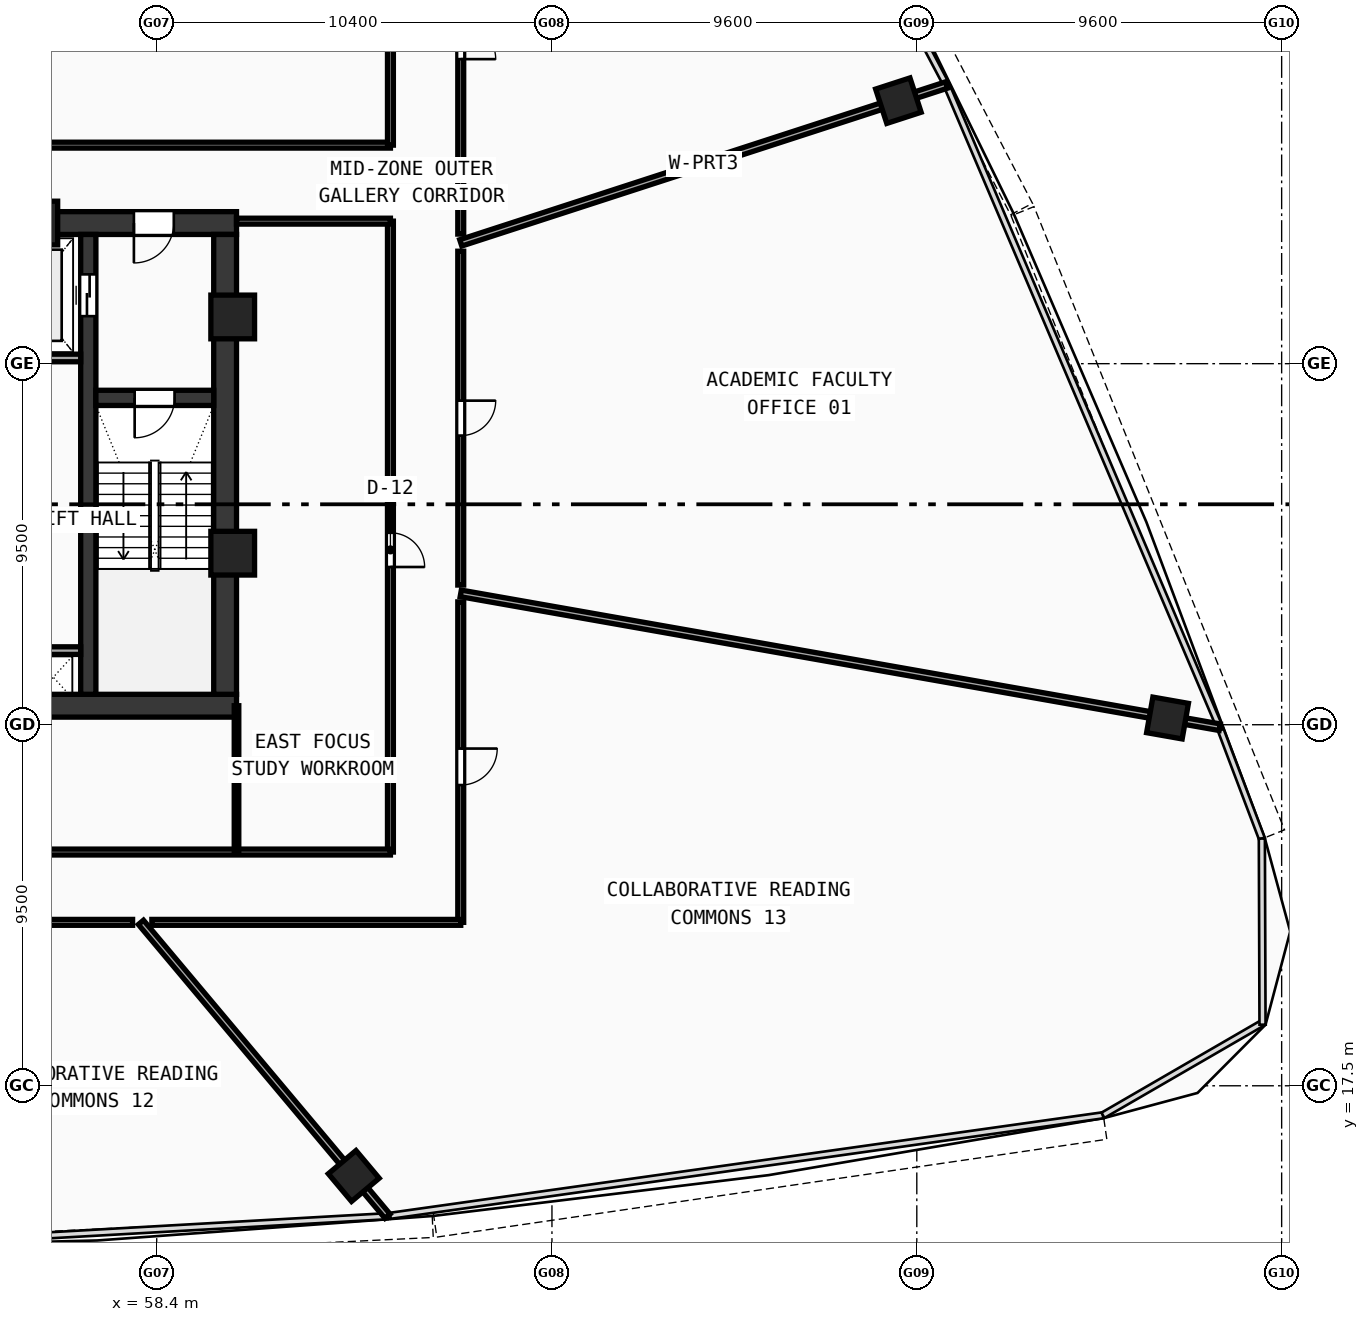
"""IFC4 building model, lengths in metres.
Left out: names, types, materials, properties, quantities, classifications, styles, units other than length and angle.
Written with IfcOpenShell. Run it as: python <this file> out.ifc"""

import sys

from ifc_helpers import new_model, si_unit, direction, frame, frame_2d, origin, origin_with_axes, origin_2d, place, context, subcontext, project, spatial, rectangle, hollow_rectangle, extrude, source, transform, mapped, element, fill, save


model = new_model("IFC4")
c1 = context("Model", 3, precision=1e-05, world=origin(), true_north=direction((0.0, 1.0)))
c2 = subcontext(c1, "Body", "Model", "MODEL_VIEW")
j1 = project(units=[si_unit("LENGTHUNIT", "METRE"), si_unit("PLANEANGLEUNIT", "RADIAN")], contexts=[c1])
p1 = place(None, origin())
s1 = spatial("IfcSite", under=j1, at=p1, CompositionType="ELEMENT")
p2 = place(p1, origin())
s2 = spatial("IfcBuilding", under=s1, at=p2, CompositionType="ELEMENT")
p3 = place(p2, frame((0.0, 0.0, 155.59)))
s3 = spatial("IfcBuildingStorey", under=s2, at=p3, CompositionType="ELEMENT", Elevation=155.59)
p4 = place(p3, frame((35.5, 27.5, 0.0), z_axis=(0.0, 0.0, 1.0), x_axis=(1.0, 0.0, 0.0)))
e1 = element("IfcWall", 1, at=p4, inside=s3, PredefinedType="SHEAR", context=c2, shape_type="SweptSolid", body=[
    extrude(rectangle(XDim=25.0, YDim=0.6, at=frame_2d((12.5, 0.0))), origin(), (0.0, 0.0, 1.0), 3.42),
])
p5 = place(p3, frame((49.2, 40.2, 0.0), z_axis=(0.0, 0.0, 1.0), x_axis=(1.0, 0.0, 0.0)))
e2 = element("IfcWall", 2, at=p5, inside=s3, PredefinedType="SHEAR", context=c2, shape_type="SweptSolid", body=[
    extrude(rectangle(XDim=11.3, YDim=0.6, at=frame_2d((5.65, 0.0))), origin(), (0.0, 0.0, 1.0), 3.42),
])
p6 = place(p5, frame((8.6, 0.0, 0.0)))
e3 = element("IfcOpeningElement", 3, at=p6, cuts=e2, PredefinedType="OPENING", context=c2, shape_type="SweptSolid", body=[
    extrude(rectangle(XDim=1.05, YDim=2.1, at=frame_2d((0.525, 1.05))), frame((0.0, 0.31, 0.0), z_axis=(0.0, -1.0, 0.0), x_axis=(1.0, 0.0, 0.0)), (0.0, 0.0, 1.0), 0.62),
])
p7 = place(p3, frame((60.2, 27.8, 0.0), z_axis=(0.0, 0.0, 1.0), x_axis=(0.0, 1.0, 0.0)))
e4 = element("IfcWall", 4, at=p7, inside=s3, PredefinedType="SHEAR", context=c2, shape_type="SweptSolid", body=[
    extrude(rectangle(XDim=12.1, YDim=0.6, at=frame_2d((6.05, 0.0))), origin(), (0.0, 0.0, 1.0), 3.42),
])
p8 = place(p3, frame((56.6, 27.8, 0.0), z_axis=(0.0, 0.0, 1.0), x_axis=(0.0, 1.0, 0.0)))
e5 = element("IfcWall", 5, at=p8, inside=s3, PredefinedType="SHEAR", context=c2, shape_type="SweptSolid", body=[
    extrude(rectangle(XDim=12.1, YDim=0.4, at=frame_2d((6.05, 0.0))), origin(), (0.0, 0.0, 1.0), 3.42),
])
p9 = place(p8, frame((9.95, 0.0, 0.0)))
e6 = element("IfcOpeningElement", 6, at=p9, cuts=e5, PredefinedType="OPENING", context=c2, shape_type="SweptSolid", body=[
    extrude(rectangle(XDim=1.1, YDim=2.1, at=frame_2d((0.55, 1.05))), frame((0.0, 0.21, 0.0), z_axis=(0.0, -1.0, 0.0), x_axis=(1.0, 0.0, 0.0)), (0.0, 0.0, 1.0), 0.42),
])
p10 = place(p3, frame((56.8, 35.6, 0.0), z_axis=(0.0, 0.0, 1.0), x_axis=(1.0, 0.0, 0.0)))
e7 = element("IfcWall", 7, at=p10, inside=s3, PredefinedType="SHEAR", context=c2, shape_type="SweptSolid", body=[
    extrude(rectangle(XDim=3.1, YDim=0.4, at=frame_2d((1.55, 0.0))), origin(), (0.0, 0.0, 1.0), 3.42),
])
p11 = place(p10, frame((1.02, 0.0, 0.0)))
e8 = element("IfcOpeningElement", 8, at=p11, cuts=e7, PredefinedType="OPENING", context=c2, shape_type="SweptSolid", body=[
    extrude(rectangle(XDim=1.05, YDim=2.1, at=frame_2d((0.525, 1.05))), frame((0.0, 0.21, 0.0), z_axis=(0.0, -1.0, 0.0), x_axis=(1.0, 0.0, 0.0)), (0.0, 0.0, 1.0), 0.42),
])
m1 = source(origin(), c2, "Body", "SweptSolid", [
    extrude(hollow_rectangle(XDim=1.15, YDim=1.15, WallThickness=0.048, at=origin_2d()), origin(), (0.0, 0.0, 1.0), 3.68),
])
for number, where, z_axis, x_axis in (
    (9, (60.4, 31.513, -0.26), (0.0, 0.0, 1.0), (1.0, 0.0, 0.0)),
    (10, (60.4, 37.729, -0.26), (0.0, 0.0, 1.0), (1.0, 0.0, 0.0)),
    (11, (55.219, 40.2, -0.26), (0.0, 0.0, 1.0), (1.0, 0.0, 0.0)),
):
    element("IfcColumn", number, at=place(p3, frame(where, z_axis=z_axis, x_axis=x_axis)), inside=s3, PredefinedType="COLUMN", context=c2, shape_type="MappedRepresentation", body=[
        mapped(m1, transform((0.0, 0.0, 0.0), scale=1.0)),
    ])
m2 = source(origin(), c2, "Body", "SweptSolid", [
    extrude(hollow_rectangle(XDim=0.95, YDim=0.95, WallThickness=0.04, at=origin_2d()), origin(), (0.0, 0.0, 1.0), 3.68),
])
for number, where, z_axis, x_axis in (
    (12, (63.585, 15.126, -0.26), (0.0, 0.0, 1.0), (0.766, 0.643, 0.0)),
    (13, (84.997, 27.177, -0.26), (0.0, 0.0, 1.0), (0.174, 0.985, 0.0)),
    (14, (77.915, 43.42, -0.26), (0.0, 0.0, 1.0), (-0.309, 0.951, 0.0)),
):
    element("IfcColumn", number, at=place(p3, frame(where, z_axis=z_axis, x_axis=x_axis)), inside=s3, PredefinedType="COLUMN", context=c2, shape_type="MappedRepresentation", body=[
        mapped(m2, transform((0.0, 0.0, 0.0), scale=1.0)),
    ])
p12 = place(p3, frame((53.68, 36.65, 0.0), z_axis=(0.0, 0.0, 1.0), x_axis=(1.0, 0.0, 0.0)))
e15 = element("IfcWall", 15, at=p12, inside=s3, PredefinedType="SOLIDWALL", context=c2, shape_type="SweptSolid", body=[
    extrude(rectangle(XDim=2.72, YDim=0.2, at=frame_2d((1.36, 0.0))), origin(), (0.0, 0.0, 1.0), 3.42),
])
p13 = place(p3, frame((55.12, 28.95, 0.0), z_axis=(0.0, 0.0, 1.0), x_axis=(1.0, 0.0, 0.0)))
e16 = element("IfcWall", 16, at=p13, inside=s3, PredefinedType="SOLIDWALL", context=c2, shape_type="SweptSolid", body=[
    extrude(rectangle(XDim=1.28, YDim=0.2, at=frame_2d((0.64, 0.0))), origin(), (0.0, 0.0, 1.0), 3.42),
])
p14 = place(p3, frame((31.45, 42.25, 0.0), z_axis=(0.0, 0.0, 1.0), x_axis=(1.0, 0.0, 0.0)))
e17 = element("IfcWall", 17, at=p14, inside=s3, PredefinedType="PARTITIONING", context=c2, shape_type="SweptSolid", body=[
    extrude(rectangle(XDim=33.1, YDim=0.155, at=frame_2d((16.55, 0.0))), origin(), (0.0, 0.0, 1.0), 2.77),
])
p15 = place(p3, frame((64.55, 42.25, 0.0), z_axis=(0.0, 0.0, 1.0), x_axis=(0.0, 1.0, 0.0)))
e18 = element("IfcWall", 18, at=p15, inside=s3, PredefinedType="PARTITIONING", context=c2, shape_type="SweptSolid", body=[
    extrude(rectangle(XDim=11.7, YDim=0.155, at=frame_2d((5.85, 0.0))), origin(), (0.0, 0.0, 1.0), 2.77),
])
p16 = place(p3, frame((64.55, 23.65, 0.0), z_axis=(0.0, 0.0, 1.0), x_axis=(0.0, 1.0, 0.0)))
e19 = element("IfcWall", 19, at=p16, inside=s3, PredefinedType="PARTITIONING", context=c2, shape_type="SweptSolid", body=[
    extrude(rectangle(XDim=16.6, YDim=0.155, at=frame_2d((8.3, 0.0))), origin(), (0.0, 0.0, 1.0), 2.77),
])
p17 = place(p16, frame((7.5, 0.0, 0.0)))
e20 = element("IfcOpeningElement", 20, at=p17, cuts=e19, PredefinedType="OPENING", context=c2, shape_type="SweptSolid", body=[
    extrude(rectangle(XDim=0.9, YDim=2.08, at=frame_2d((0.45, 1.04))), frame((0.0, 0.087, 0.0), z_axis=(0.0, -1.0, 0.0), x_axis=(1.0, 0.0, 0.0)), (0.0, 0.0, 1.0), 0.175),
])
p18 = place(p3, frame((31.45, 23.65, 0.0), z_axis=(0.0, 0.0, 1.0), x_axis=(1.0, 0.0, 0.0)))
e21 = element("IfcWall", 21, at=p18, inside=s3, PredefinedType="PARTITIONING", context=c2, shape_type="SweptSolid", body=[
    extrude(rectangle(XDim=33.1, YDim=0.155, at=frame_2d((16.55, 0.0))), origin(), (0.0, 0.0, 1.0), 2.77),
])
p19 = place(p18, frame((16.0, 0.0, 0.0)))
e22 = element("IfcOpeningElement", 22, at=p19, cuts=e21, PredefinedType="OPENING", context=c2, shape_type="SweptSolid", body=[
    extrude(rectangle(XDim=0.92, YDim=2.1, at=frame_2d((0.46, 1.05))), frame((0.0, 0.087, 0.0), z_axis=(0.0, -1.0, 0.0), x_axis=(1.0, 0.0, 0.0)), (0.0, 0.0, 1.0), 0.175),
])
p20 = place(p3, frame((60.5, 40.25, 0.0), z_axis=(0.0, 0.0, 1.0), x_axis=(1.0, 0.0, 0.0)))
e23 = element("IfcWall", 23, at=p20, inside=s3, PredefinedType="PARTITIONING", context=c2, shape_type="SweptSolid", body=[
    extrude(rectangle(XDim=4.05, YDim=0.155, at=frame_2d((2.025, 0.0))), origin(), (0.0, 0.0, 1.0), 3.42),
])
p21 = place(p3, frame((60.5, 23.65, 0.0), z_axis=(0.0, 0.0, 1.0), x_axis=(0.0, 1.0, 0.0)))
e24 = element("IfcWall", 24, at=p21, inside=s3, PredefinedType="PARTITIONING", context=c2, shape_type="SweptSolid", body=[
    extrude(rectangle(XDim=3.85, YDim=0.12, at=frame_2d((1.925, 0.0))), origin(), (0.0, 0.0, 1.0), 3.02),
])
p22 = place(p3, frame((66.4, 39.678, 0.0), z_axis=(0.0, 0.0, 1.0), x_axis=(0.951059027278, 0.309009266259, 0.0)))
e25 = element("IfcWall", 25, at=p22, inside=s3, PredefinedType="PARTITIONING", context=c2, shape_type="SweptSolid", body=[
    extrude(rectangle(XDim=13.441, YDim=0.175, at=frame_2d((6.72, 0.0))), origin(), (0.0, 0.0, 1.0), 2.77),
])
p23 = place(p3, frame((57.985, 21.8, 0.0), z_axis=(0.0, 0.0, 1.0), x_axis=(0.642793186641, -0.766039763464, 0.0)))
e26 = element("IfcWall", 26, at=p23, inside=s3, PredefinedType="PARTITIONING", context=c2, shape_type="SweptSolid", body=[
    extrude(rectangle(XDim=10.093, YDim=0.175, at=frame_2d((5.046, 0.0))), origin(), (0.0, 0.0, 1.0), 2.77),
])
p24 = place(p3, frame((66.4, 30.456, 0.0), z_axis=(0.0, 0.0, 1.0), x_axis=(0.98480815319, -0.173645908133, 0.0)))
e27 = element("IfcWall", 27, at=p24, inside=s3, PredefinedType="PARTITIONING", context=c2, shape_type="SweptSolid", body=[
    extrude(rectangle(XDim=20.278, YDim=0.175, at=frame_2d((10.139, 0.0))), origin(), (0.0, 0.0, 1.0), 2.77),
])
p25 = place(p3, frame((66.4, 50.048, 0.0), z_axis=(0.0, 0.0, 1.0), x_axis=(0.0, -1.0, 0.0)))
e28 = element("IfcWall", 28, at=p25, inside=s3, PredefinedType="PARTITIONING", context=c2, shape_type="SweptSolid", body=[
    extrude(rectangle(XDim=10.138, YDim=0.155, at=frame_2d((5.069, 0.0))), origin(), (0.0, 0.0, 1.0), 2.77),
])
p26 = place(p25, frame((4.615, 0.0, 0.0)))
e29 = element("IfcOpeningElement", 29, at=p26, cuts=e28, PredefinedType="OPENING", context=c2, shape_type="SweptSolid", body=[
    extrude(rectangle(XDim=0.92, YDim=2.1, at=frame_2d((0.46, 1.05))), frame((0.0, 0.087, 0.0), z_axis=(0.0, -1.0, 0.0), x_axis=(1.0, 0.0, 0.0)), (0.0, 0.0, 1.0), 0.175),
])
p27 = place(p3, frame((66.4, 39.459, 0.0), z_axis=(0.0, 0.0, 1.0), x_axis=(0.0, -1.0, 0.0)))
e30 = element("IfcWall", 30, at=p27, inside=s3, PredefinedType="PARTITIONING", context=c2, shape_type="SweptSolid", body=[
    extrude(rectangle(XDim=8.783, YDim=0.155, at=frame_2d((4.392, 0.0))), origin(), (0.0, 0.0, 1.0), 3.42),
])
p28 = place(p27, frame((3.932, 0.0, 0.0)))
e31 = element("IfcOpeningElement", 31, at=p28, cuts=e30, PredefinedType="OPENING", context=c2, shape_type="SweptSolid", body=[
    extrude(rectangle(XDim=0.92, YDim=2.1, at=frame_2d((0.46, 1.05))), frame((0.0, 0.087, 0.0), z_axis=(0.0, -1.0, 0.0), x_axis=(1.0, 0.0, 0.0)), (0.0, 0.0, 1.0), 0.175),
])
p29 = place(p3, frame((66.4, 30.232, 0.0), z_axis=(0.0, 0.0, 1.0), x_axis=(0.0, -1.0, 0.0)))
e32 = element("IfcWall", 32, at=p29, inside=s3, PredefinedType="PARTITIONING", context=c2, shape_type="SweptSolid", body=[
    extrude(rectangle(XDim=8.432, YDim=0.155, at=frame_2d((4.216, 0.0))), origin(), (0.0, 0.0, 1.0), 3.02),
])
p30 = place(p29, frame((3.859, 0.0, 0.0)))
e33 = element("IfcOpeningElement", 33, at=p30, cuts=e32, PredefinedType="OPENING", context=c2, shape_type="SweptSolid", body=[
    extrude(rectangle(XDim=0.96, YDim=2.12, at=frame_2d((0.48, 1.06))), frame((0.0, 0.087, 0.0), z_axis=(0.0, -1.0, 0.0), x_axis=(1.0, 0.0, 0.0)), (0.0, 0.0, 1.0), 0.175),
])
p31 = place(p3, frame((66.4, 21.8, 0.0), z_axis=(0.0, 0.0, 1.0), x_axis=(-1.0, 0.0, 0.0)))
e34 = element("IfcWall", 34, at=p31, inside=s3, PredefinedType="PARTITIONING", context=c2, shape_type="SweptSolid", body=[
    extrude(rectangle(XDim=8.127, YDim=0.155, at=frame_2d((4.064, 0.0))), origin(), (0.0, 0.0, 1.0), 3.02),
])
p32 = place(p3, frame((57.765, 21.8, 0.0), z_axis=(0.0, 0.0, 1.0), x_axis=(-1.0, 0.0, 0.0)))
e35 = element("IfcWall", 35, at=p32, inside=s3, PredefinedType="PARTITIONING", context=c2, shape_type="SweptSolid", body=[
    extrude(rectangle(XDim=6.349, YDim=0.155, at=frame_2d((3.174, 0.0))), origin(), (0.0, 0.0, 1.0), 2.77),
])
p33 = place(p32, frame((2.703, 0.0, 0.0)))
e36 = element("IfcOpeningElement", 36, at=p33, cuts=e35, PredefinedType="OPENING", context=c2, shape_type="SweptSolid", body=[
    extrude(rectangle(XDim=0.96, YDim=2.12, at=frame_2d((0.48, 1.06))), frame((0.0, 0.087, 0.0), z_axis=(0.0, -1.0, 0.0), x_axis=(1.0, 0.0, 0.0)), (0.0, 0.0, 1.0), 0.175),
])
m3 = source(origin(), c2, "Body", "SweptSolid", [
    extrude(rectangle(XDim=1.05, YDim=2.1, at=frame_2d((0.525, 1.05))), frame((0.0, 0.025, 0.0), z_axis=(0.0, -1.0, 0.0), x_axis=(1.0, 0.0, 0.0)), (0.0, 0.0, 1.0), 0.05),
])
p34 = place(p11, frame((1.05, 0.0, 0.0), z_axis=(0.0, 0.0, 1.0), x_axis=(-1.0, 0.0, 0.0)))
e37 = element("IfcDoor", 37, at=p34, inside=s3, OperationType="SINGLE_SWING_RIGHT", PredefinedType="DOOR", context=c2, shape_type="MappedRepresentation", body=[
    mapped(m3, transform((0.0, 0.0, 0.0), scale=1.0)),
])
fill(e8, e37)
p35 = place(p6, frame((1.05, 0.0, 0.0), z_axis=(0.0, 0.0, 1.0), x_axis=(-1.0, 0.0, 0.0)))
e38 = element("IfcDoor", 38, at=p35, inside=s3, OperationType="SINGLE_SWING_RIGHT", PredefinedType="DOOR", context=c2, shape_type="MappedRepresentation", body=[
    mapped(m3, transform((0.0, 0.0, 0.0), scale=1.0)),
])
fill(e3, e38)
m4 = source(origin(), c2, "Body", "SweptSolid", [
    extrude(rectangle(XDim=1.1, YDim=2.1, at=frame_2d((0.55, 1.05))), frame((0.0, 0.025, 0.0), z_axis=(0.0, -1.0, 0.0), x_axis=(1.0, 0.0, 0.0)), (0.0, 0.0, 1.0), 0.05),
])
p36 = place(p9, origin_with_axes())
e39 = element("IfcDoor", 39, at=p36, inside=s3, OperationType="DOUBLE_DOOR_SLIDING", PredefinedType="DOOR", context=c2, shape_type="MappedRepresentation", body=[
    mapped(m4, transform((0.0, 0.0, 0.0), scale=1.0)),
])
fill(e6, e39)
m5 = source(origin(), c2, "Body", "SweptSolid", [
    extrude(rectangle(XDim=0.9, YDim=2.08, at=frame_2d((0.45, 1.04))), frame((0.0, 0.025, 0.0), z_axis=(0.0, -1.0, 0.0), x_axis=(1.0, 0.0, 0.0)), (0.0, 0.0, 1.0), 0.05),
])
p37 = place(p17, frame((0.9, 0.0, 0.0), z_axis=(0.0, 0.0, 1.0), x_axis=(-1.0, 0.0, 0.0)))
e40 = element("IfcDoor", 40, at=p37, inside=s3, OperationType="SINGLE_SWING_RIGHT", PredefinedType="DOOR", context=c2, shape_type="MappedRepresentation", body=[
    mapped(m5, transform((0.0, 0.0, 0.0), scale=1.0)),
])
fill(e20, e40)
m6 = source(origin(), c2, "Body", "SweptSolid", [
    extrude(rectangle(XDim=0.92, YDim=2.1, at=frame_2d((0.46, 1.05))), frame((0.0, 0.025, 0.0), z_axis=(0.0, -1.0, 0.0), x_axis=(1.0, 0.0, 0.0)), (0.0, 0.0, 1.0), 0.05),
])
p38 = place(p28, origin_with_axes())
e41 = element("IfcDoor", 41, at=p38, inside=s3, OperationType="SINGLE_SWING_LEFT", PredefinedType="DOOR", context=c2, shape_type="MappedRepresentation", body=[
    mapped(m6, transform((0.0, 0.0, 0.0), scale=1.0)),
])
fill(e31, e41)
p39 = place(p26, origin_with_axes())
e42 = element("IfcDoor", 42, at=p39, inside=s3, OperationType="SINGLE_SWING_RIGHT", PredefinedType="DOOR", context=c2, shape_type="MappedRepresentation", body=[
    mapped(m6, transform((0.0, 0.0, 0.0), scale=1.0)),
])
fill(e29, e42)
m7 = source(origin(), c2, "Body", "SweptSolid", [
    extrude(rectangle(XDim=0.96, YDim=2.12, at=frame_2d((0.48, 1.06))), frame((0.0, 0.025, 0.0), z_axis=(0.0, -1.0, 0.0), x_axis=(1.0, 0.0, 0.0)), (0.0, 0.0, 1.0), 0.05),
])
p40 = place(p30, origin_with_axes())
e43 = element("IfcDoor", 43, at=p40, inside=s3, OperationType="SINGLE_SWING_LEFT", PredefinedType="DOOR", context=c2, shape_type="MappedRepresentation", body=[
    mapped(m7, transform((0.0, 0.0, 0.0), scale=1.0)),
])
fill(e33, e43)
save(model, sys.argv[1])
